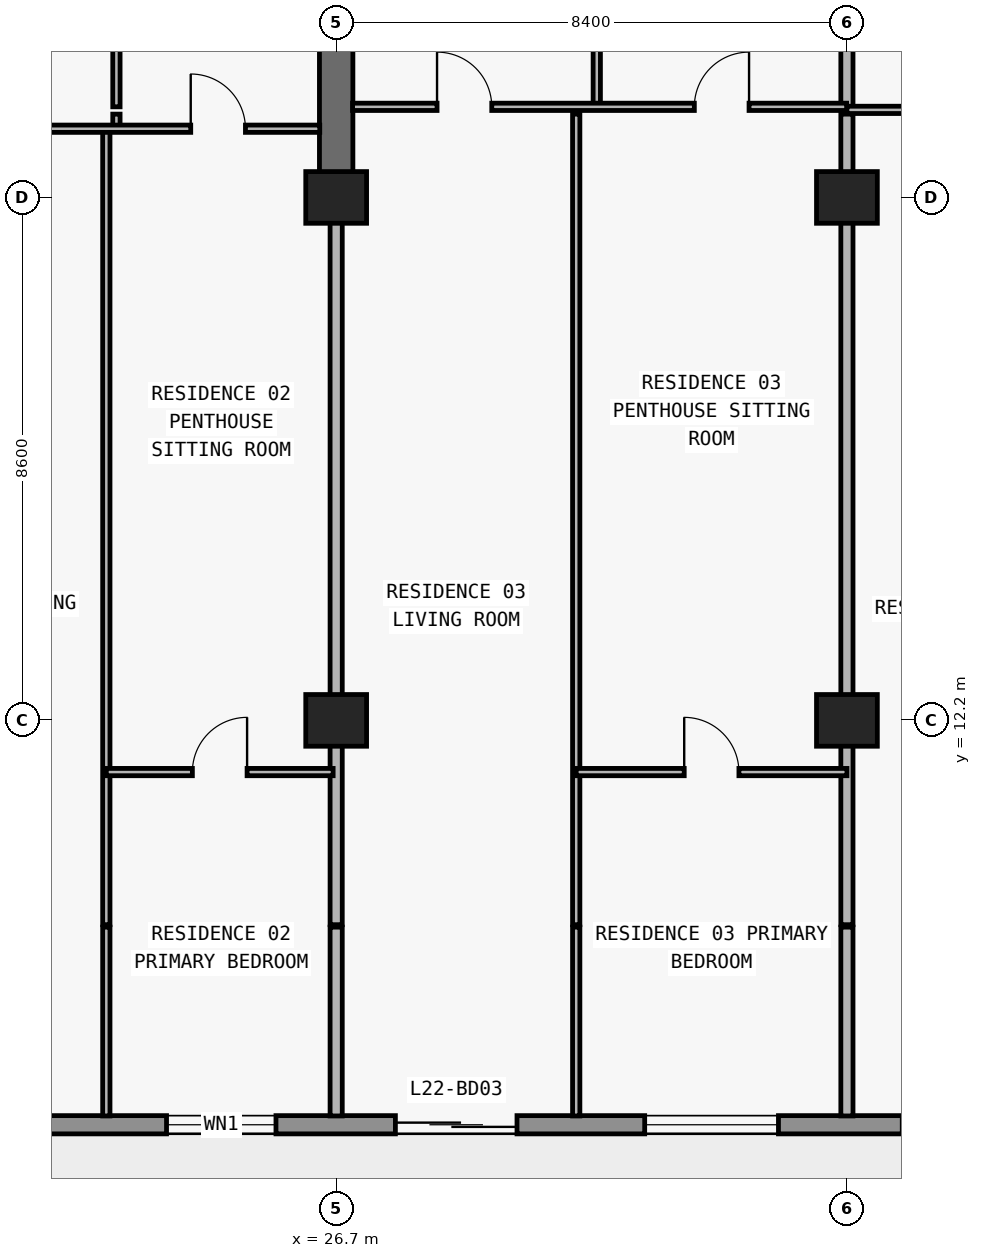
"""IFC4 building model, lengths in metres.
Left out: names, types, materials, properties, quantities, classifications, styles, units other than length and angle.
Written with IfcOpenShell. Run it as: python <this file> out.ifc"""

import sys

from ifc_helpers import new_model, si_unit, direction, frame, frame_2d, origin, origin_2d, place, context, subcontext, project, spatial, rectangle, extrude, element, fill, save


model = new_model("IFC4")
c1 = context("Model", 3, precision=1e-05, world=origin(), true_north=direction((0.0, 1.0)))
c2 = subcontext(c1, "Body", "Model", "MODEL_VIEW")
j1 = project(units=[si_unit("LENGTHUNIT", "METRE"), si_unit("PLANEANGLEUNIT", "RADIAN")], contexts=[c1])
p1 = place(None, origin())
s1 = spatial("IfcSite", under=j1, at=p1, CompositionType="ELEMENT")
p2 = place(p1, origin())
s2 = spatial("IfcBuilding", under=s1, at=p2, CompositionType="ELEMENT")
p3 = place(p2, frame((0.0, 0.0, 84.6)))
s3 = spatial("IfcBuildingStorey", under=s2, at=p3, CompositionType="ELEMENT", Elevation=84.6)
for number, where, z_axis, x_axis in (
    (1, (26.7, 12.2, 0.0), (0.0, 0.0, 1.0), (1.0, 0.0, 0.0)),
    (2, (35.1, 12.2, 0.0), (0.0, 0.0, 1.0), (1.0, 0.0, 0.0)),
    (3, (26.7, 20.8, 0.0), (0.0, 0.0, 1.0), (1.0, 0.0, 0.0)),
    (4, (35.1, 20.8, 0.0), (0.0, 0.0, 1.0), (1.0, 0.0, 0.0)),
):
    element("IfcColumn", number, at=place(p3, frame(where, z_axis=z_axis, x_axis=x_axis)), inside=s3, PredefinedType="COLUMN", context=c2, shape_type="SweptSolid", body=[
        extrude(rectangle(XDim=1.0, YDim=0.85, at=origin_2d()), origin(), (0.0, 0.0, 1.0), 3.05),
    ])
p4 = place(p3, frame((26.7, 20.8, 0.0), z_axis=(0.0, 0.0, 1.0), x_axis=(0.0, 1.0, 0.0)))
e5 = element("IfcWall", 5, at=p4, inside=s3, PredefinedType="SHEAR", context=c2, shape_type="SweptSolid", body=[
    extrude(rectangle(XDim=8.6, YDim=0.55, at=frame_2d((4.3, 0.0))), origin(), (0.0, 0.0, 1.0), 3.05),
])
p5 = place(p3, frame((70.1, 5.55, 0.0), z_axis=(0.0, 0.0, 1.0), x_axis=(-1.0, 0.0, 0.0)))
e6 = element("IfcWall", 6, at=p5, inside=s3, PredefinedType="STANDARD", context=c2, shape_type="SweptSolid", body=[
    extrude(rectangle(XDim=62.4, YDim=0.3, at=frame_2d((31.2, 0.0))), origin(), (0.0, 0.0, 1.0), 3.05),
])
p6 = place(p5, frame((57.226, 0.0, 0.0)))
e7 = element("IfcOpeningElement", 7, at=p6, cuts=e6, PredefinedType="OPENING", context=c2, shape_type="SweptSolid", body=[
    extrude(rectangle(XDim=2.0, YDim=2.3, at=frame_2d((1.0, 1.15))), frame((0.0, 0.16, 0.0), z_axis=(0.0, -1.0, 0.0), x_axis=(1.0, 0.0, 0.0)), (0.0, 0.0, 1.0), 0.32),
])
p7 = place(p5, frame((52.926, 0.0, 0.85)))
e8 = element("IfcOpeningElement", 8, at=p7, cuts=e6, PredefinedType="OPENING", context=c2, shape_type="SweptSolid", body=[
    extrude(rectangle(XDim=2.2, YDim=1.55, at=frame_2d((1.1, 0.775))), frame((0.0, 0.16, 0.0), z_axis=(0.0, -1.0, 0.0), x_axis=(1.0, 0.0, 0.0)), (0.0, 0.0, 1.0), 0.32),
])
p8 = place(p5, frame((48.49, 0.0, 0.0)))
e9 = element("IfcOpeningElement", 9, at=p8, cuts=e6, PredefinedType="OPENING", context=c2, shape_type="SweptSolid", body=[
    extrude(rectangle(XDim=2.0, YDim=2.3, at=frame_2d((1.0, 1.15))), frame((0.0, 0.16, 0.0), z_axis=(0.0, -1.0, 0.0), x_axis=(1.0, 0.0, 0.0)), (0.0, 0.0, 1.0), 0.32),
])
p9 = place(p5, frame((44.39, 0.0, 0.85)))
e10 = element("IfcOpeningElement", 10, at=p9, cuts=e6, PredefinedType="OPENING", context=c2, shape_type="SweptSolid", body=[
    extrude(rectangle(XDim=1.8, YDim=1.55, at=frame_2d((0.9, 0.775))), frame((0.0, 0.16, 0.0), z_axis=(0.0, -1.0, 0.0), x_axis=(1.0, 0.0, 0.0)), (0.0, 0.0, 1.0), 0.32),
])
p10 = place(p5, frame((40.426, 0.0, 0.0)))
e11 = element("IfcOpeningElement", 11, at=p10, cuts=e6, PredefinedType="OPENING", context=c2, shape_type="SweptSolid", body=[
    extrude(rectangle(XDim=2.0, YDim=2.3, at=frame_2d((1.0, 1.15))), frame((0.0, 0.16, 0.0), z_axis=(0.0, -1.0, 0.0), x_axis=(1.0, 0.0, 0.0)), (0.0, 0.0, 1.0), 0.32),
])
p11 = place(p5, frame((36.126, 0.0, 0.85)))
e12 = element("IfcOpeningElement", 12, at=p11, cuts=e6, PredefinedType="OPENING", context=c2, shape_type="SweptSolid", body=[
    extrude(rectangle(XDim=2.2, YDim=1.55, at=frame_2d((1.1, 0.775))), frame((0.0, 0.16, 0.0), z_axis=(0.0, -1.0, 0.0), x_axis=(1.0, 0.0, 0.0)), (0.0, 0.0, 1.0), 0.32),
])
p12 = place(p5, frame((32.09, 0.0, 0.0)))
e13 = element("IfcOpeningElement", 13, at=p12, cuts=e6, PredefinedType="OPENING", context=c2, shape_type="SweptSolid", body=[
    extrude(rectangle(XDim=2.0, YDim=2.3, at=frame_2d((1.0, 1.15))), frame((0.0, 0.16, 0.0), z_axis=(0.0, -1.0, 0.0), x_axis=(1.0, 0.0, 0.0)), (0.0, 0.0, 1.0), 0.32),
])
p13 = place(p5, frame((28.21, 0.0, 0.65)))
e14 = element("IfcOpeningElement", 14, at=p13, cuts=e6, PredefinedType="OPENING", context=c2, shape_type="SweptSolid", body=[
    extrude(rectangle(XDim=2.6, YDim=1.85, at=frame_2d((1.3, 0.925))), frame((0.0, 0.16, 0.0), z_axis=(0.0, -1.0, 0.0), x_axis=(1.0, 0.0, 0.0)), (0.0, 0.0, 1.0), 0.32),
])
p14 = place(p5, frame((22.1, 0.0, 0.85)))
e15 = element("IfcOpeningElement", 15, at=p14, cuts=e6, PredefinedType="OPENING", context=c2, shape_type="SweptSolid", body=[
    extrude(rectangle(XDim=2.2, YDim=1.55, at=frame_2d((1.1, 0.775))), frame((0.0, 0.16, 0.0), z_axis=(0.0, -1.0, 0.0), x_axis=(1.0, 0.0, 0.0)), (0.0, 0.0, 1.0), 0.32),
])
p15 = place(p5, frame((16.026, 0.0, 0.0)))
e16 = element("IfcOpeningElement", 16, at=p15, cuts=e6, PredefinedType="OPENING", context=c2, shape_type="SweptSolid", body=[
    extrude(rectangle(XDim=2.0, YDim=2.3, at=frame_2d((1.0, 1.15))), frame((0.0, 0.16, 0.0), z_axis=(0.0, -1.0, 0.0), x_axis=(1.0, 0.0, 0.0)), (0.0, 0.0, 1.0), 0.32),
])
p16 = place(p5, frame((11.726, 0.0, 0.85)))
e17 = element("IfcOpeningElement", 17, at=p16, cuts=e6, PredefinedType="OPENING", context=c2, shape_type="SweptSolid", body=[
    extrude(rectangle(XDim=2.2, YDim=1.55, at=frame_2d((1.1, 0.775))), frame((0.0, 0.16, 0.0), z_axis=(0.0, -1.0, 0.0), x_axis=(1.0, 0.0, 0.0)), (0.0, 0.0, 1.0), 0.32),
])
p17 = place(p5, frame((7.29, 0.0, 0.0)))
e18 = element("IfcOpeningElement", 18, at=p17, cuts=e6, PredefinedType="OPENING", context=c2, shape_type="SweptSolid", body=[
    extrude(rectangle(XDim=2.0, YDim=2.3, at=frame_2d((1.0, 1.15))), frame((0.0, 0.16, 0.0), z_axis=(0.0, -1.0, 0.0), x_axis=(1.0, 0.0, 0.0)), (0.0, 0.0, 1.0), 0.32),
])
p18 = place(p5, frame((3.19, 0.0, 0.85)))
e19 = element("IfcOpeningElement", 19, at=p18, cuts=e6, PredefinedType="OPENING", context=c2, shape_type="SweptSolid", body=[
    extrude(rectangle(XDim=1.8, YDim=1.55, at=frame_2d((0.9, 0.775))), frame((0.0, 0.16, 0.0), z_axis=(0.0, -1.0, 0.0), x_axis=(1.0, 0.0, 0.0)), (0.0, 0.0, 1.0), 0.32),
])
p19 = place(p3, frame((22.92, 5.695, 0.0), z_axis=(0.0, 0.0, 1.0), x_axis=(0.0, 1.0, 0.0)))
e20 = element("IfcWall", 20, at=p19, inside=s3, PredefinedType="PARTITIONING", context=c2, shape_type="SweptSolid", body=[
    extrude(rectangle(XDim=3.105, YDim=0.12, at=frame_2d((1.552, 0.0))), origin(), (0.0, 0.0, 1.0), 3.05),
])
p20 = place(p3, frame((22.92, 8.84, 0.0), z_axis=(0.0, 0.0, 1.0), x_axis=(0.0, 1.0, 0.0)))
e21 = element("IfcWall", 21, at=p20, inside=s3, PredefinedType="PARTITIONING", context=c2, shape_type="SweptSolid", body=[
    extrude(rectangle(XDim=13.09, YDim=0.12, at=frame_2d((6.545, 0.0))), origin(), (0.0, 0.0, 1.0), 3.05),
])
p21 = place(p3, frame((23.086, 21.935, 0.0), z_axis=(0.0, 0.0, 1.0), x_axis=(0.0, 1.0, 0.0)))
e22 = element("IfcWall", 22, at=p21, inside=s3, PredefinedType="PARTITIONING", context=c2, shape_type="SweptSolid", body=[
    extrude(rectangle(XDim=0.235, YDim=0.12, at=frame_2d((0.117, 0.0))), origin(), (0.0, 0.0, 1.0), 3.05),
])
p22 = place(p3, frame((23.086, 22.29, 0.0), z_axis=(0.0, 0.0, 1.0), x_axis=(0.0, 1.0, 0.0)))
e23 = element("IfcWall", 23, at=p22, inside=s3, PredefinedType="PARTITIONING", context=c2, shape_type="SweptSolid", body=[
    extrude(rectangle(XDim=4.69, YDim=0.12, at=frame_2d((2.345, 0.0))), origin(), (0.0, 0.0, 1.0), 3.05),
])
p23 = place(p22, frame((1.895, 0.0, 0.0)))
e24 = element("IfcOpeningElement", 24, at=p23, cuts=e23, PredefinedType="OPENING", context=c2, shape_type="SweptSolid", body=[
    extrude(rectangle(XDim=0.9, YDim=2.15, at=frame_2d((0.45, 1.075))), frame((0.0, 0.07, 0.0), z_axis=(0.0, -1.0, 0.0), x_axis=(1.0, 0.0, 0.0)), (0.0, 0.0, 1.0), 0.14),
])
p24 = place(p3, frame((26.7, 5.695, 0.0), z_axis=(0.0, 0.0, 1.0), x_axis=(0.0, 1.0, 0.0)))
e25 = element("IfcWall", 25, at=p24, inside=s3, PredefinedType="PARTITIONING", context=c2, shape_type="SweptSolid", body=[
    extrude(rectangle(XDim=3.105, YDim=0.2, at=frame_2d((1.552, 0.0))), origin(), (0.0, 0.0, 1.0), 3.05),
])
p25 = place(p3, frame((26.7, 8.84, 0.0), z_axis=(0.0, 0.0, 1.0), x_axis=(0.0, 1.0, 0.0)))
e26 = element("IfcWall", 26, at=p25, inside=s3, PredefinedType="PARTITIONING", context=c2, shape_type="SweptSolid", body=[
    extrude(rectangle(XDim=11.955, YDim=0.2, at=frame_2d((5.978, 0.0))), origin(), (0.0, 0.0, 1.0), 2.174),
])
p26 = place(p3, frame((30.648, 5.695, 0.0), z_axis=(0.0, 0.0, 1.0), x_axis=(0.0, 1.0, 0.0)))
e27 = element("IfcWall", 27, at=p26, inside=s3, PredefinedType="PARTITIONING", context=c2, shape_type="SweptSolid", body=[
    extrude(rectangle(XDim=3.105, YDim=0.12, at=frame_2d((1.552, 0.0))), origin(), (0.0, 0.0, 1.0), 3.05),
])
p27 = place(p3, frame((30.648, 8.84, 0.0), z_axis=(0.0, 0.0, 1.0), x_axis=(0.0, 1.0, 0.0)))
e28 = element("IfcWall", 28, at=p27, inside=s3, PredefinedType="PARTITIONING", context=c2, shape_type="SweptSolid", body=[
    extrude(rectangle(XDim=13.33, YDim=0.12, at=frame_2d((6.665, 0.0))), origin(), (0.0, 0.0, 1.0), 3.05),
])
p28 = place(p3, frame((30.986, 22.29, 0.0), z_axis=(0.0, 0.0, 1.0), x_axis=(0.0, 1.0, 0.0)))
e29 = element("IfcWall", 29, at=p28, inside=s3, PredefinedType="PARTITIONING", context=c2, shape_type="SweptSolid", body=[
    extrude(rectangle(XDim=4.69, YDim=0.12, at=frame_2d((2.345, 0.0))), origin(), (0.0, 0.0, 1.0), 3.05),
])
p29 = place(p28, frame((1.895, 0.0, 0.0)))
e30 = element("IfcOpeningElement", 30, at=p29, cuts=e29, PredefinedType="OPENING", context=c2, shape_type="SweptSolid", body=[
    extrude(rectangle(XDim=0.9, YDim=2.15, at=frame_2d((0.45, 1.075))), frame((0.0, 0.07, 0.0), z_axis=(0.0, -1.0, 0.0), x_axis=(1.0, 0.0, 0.0)), (0.0, 0.0, 1.0), 0.14),
])
p30 = place(p3, frame((35.1, 5.695, 0.0), z_axis=(0.0, 0.0, 1.0), x_axis=(0.0, 1.0, 0.0)))
e31 = element("IfcWall", 31, at=p30, inside=s3, PredefinedType="PARTITIONING", context=c2, shape_type="SweptSolid", body=[
    extrude(rectangle(XDim=3.105, YDim=0.2, at=frame_2d((1.552, 0.0))), origin(), (0.0, 0.0, 1.0), 3.05),
])
p31 = place(p3, frame((35.1, 8.84, 0.0), z_axis=(0.0, 0.0, 1.0), x_axis=(0.0, 1.0, 0.0)))
e32 = element("IfcWall", 32, at=p31, inside=s3, PredefinedType="PARTITIONING", context=c2, shape_type="SweptSolid", body=[
    extrude(rectangle(XDim=13.33, YDim=0.2, at=frame_2d((6.665, 0.0))), origin(), (0.0, 0.0, 1.0), 2.174),
])
p32 = place(p3, frame((35.1, 22.29, 0.0), z_axis=(0.0, 0.0, 1.0), x_axis=(0.0, 1.0, 0.0)))
e33 = element("IfcWall", 33, at=p32, inside=s3, PredefinedType="PARTITIONING", context=c2, shape_type="SweptSolid", body=[
    extrude(rectangle(XDim=4.69, YDim=0.2, at=frame_2d((2.345, 0.0))), origin(), (0.0, 0.0, 1.0), 2.174),
])
p33 = place(p3, frame((22.92, 11.35, 0.0), z_axis=(0.0, 0.0, 1.0), x_axis=(1.0, 0.0, 0.0)))
e34 = element("IfcWall", 34, at=p33, inside=s3, PredefinedType="PARTITIONING", context=c2, shape_type="SweptSolid", body=[
    extrude(rectangle(XDim=3.73, YDim=0.12, at=frame_2d((1.865, 0.0))), origin(), (0.0, 0.0, 1.0), 3.05),
])
p34 = place(p33, frame((1.415, 0.0, 0.0)))
e35 = element("IfcOpeningElement", 35, at=p34, cuts=e34, PredefinedType="OPENING", context=c2, shape_type="SweptSolid", body=[
    extrude(rectangle(XDim=0.9, YDim=2.15, at=frame_2d((0.45, 1.075))), frame((0.0, 0.07, 0.0), z_axis=(0.0, -1.0, 0.0), x_axis=(1.0, 0.0, 0.0)), (0.0, 0.0, 1.0), 0.14),
])
p35 = place(p3, frame((30.648, 11.35, 0.0), z_axis=(0.0, 0.0, 1.0), x_axis=(1.0, 0.0, 0.0)))
e36 = element("IfcWall", 36, at=p35, inside=s3, PredefinedType="PARTITIONING", context=c2, shape_type="SweptSolid", body=[
    extrude(rectangle(XDim=4.452, YDim=0.12, at=frame_2d((2.226, 0.0))), origin(), (0.0, 0.0, 1.0), 3.05),
])
p36 = place(p35, frame((1.776, 0.0, 0.0)))
e37 = element("IfcOpeningElement", 37, at=p36, cuts=e36, PredefinedType="OPENING", context=c2, shape_type="SweptSolid", body=[
    extrude(rectangle(XDim=0.9, YDim=2.15, at=frame_2d((0.45, 1.075))), frame((0.0, 0.07, 0.0), z_axis=(0.0, -1.0, 0.0), x_axis=(1.0, 0.0, 0.0)), (0.0, 0.0, 1.0), 0.14),
])
p37 = place(p3, frame((18.3, 21.93, 0.0), z_axis=(0.0, 0.0, 1.0), x_axis=(1.0, 0.0, 0.0)))
e38 = element("IfcWall", 38, at=p37, inside=s3, PredefinedType="PARTITIONING", context=c2, shape_type="SweptSolid", body=[
    extrude(rectangle(XDim=8.13, YDim=0.12, at=frame_2d((4.065, 0.0))), origin(), (0.0, 0.0, 1.0), 3.05),
])
p38 = place(p37, frame((1.86, 0.0, 0.0)))
e39 = element("IfcOpeningElement", 39, at=p38, cuts=e38, PredefinedType="OPENING", context=c2, shape_type="SweptSolid", body=[
    extrude(rectangle(XDim=0.9, YDim=2.15, at=frame_2d((0.45, 1.075))), frame((0.0, 0.07, 0.0), z_axis=(0.0, -1.0, 0.0), x_axis=(1.0, 0.0, 0.0)), (0.0, 0.0, 1.0), 0.14),
])
p39 = place(p37, frame((6.008, 0.0, 0.0)))
e40 = element("IfcOpeningElement", 40, at=p39, cuts=e38, PredefinedType="OPENING", context=c2, shape_type="SweptSolid", body=[
    extrude(rectangle(XDim=0.9, YDim=2.15, at=frame_2d((0.45, 1.075))), frame((0.0, 0.07, 0.0), z_axis=(0.0, -1.0, 0.0), x_axis=(1.0, 0.0, 0.0)), (0.0, 0.0, 1.0), 0.14),
])
p40 = place(p3, frame((35.1, 22.24, 0.0), z_axis=(0.0, 0.0, 1.0), x_axis=(1.0, 0.0, 0.0)))
e41 = element("IfcWall", 41, at=p40, inside=s3, PredefinedType="PARTITIONING", context=c2, shape_type="SweptSolid", body=[
    extrude(rectangle(XDim=7.6, YDim=0.12, at=frame_2d((3.8, 0.0))), origin(), (0.0, 0.0, 1.0), 3.05),
])
p41 = place(p40, frame((3.35, 0.0, 0.0)))
e42 = element("IfcOpeningElement", 42, at=p41, cuts=e41, PredefinedType="OPENING", context=c2, shape_type="SweptSolid", body=[
    extrude(rectangle(XDim=0.9, YDim=2.15, at=frame_2d((0.45, 1.075))), frame((0.0, 0.07, 0.0), z_axis=(0.0, -1.0, 0.0), x_axis=(1.0, 0.0, 0.0)), (0.0, 0.0, 1.0), 0.14),
])
p42 = place(p3, frame((26.97, 22.29, 0.0), z_axis=(0.0, 0.0, 1.0), x_axis=(1.0, 0.0, 0.0)))
e43 = element("IfcWall", 43, at=p42, inside=s3, PredefinedType="PARTITIONING", context=c2, shape_type="SweptSolid", body=[
    extrude(rectangle(XDim=8.125, YDim=0.12, at=frame_2d((4.062, 0.0))), origin(), (0.0, 0.0, 1.0), 3.05),
])
p43 = place(p42, frame((1.389, 0.0, 0.0)))
e44 = element("IfcOpeningElement", 44, at=p43, cuts=e43, PredefinedType="OPENING", context=c2, shape_type="SweptSolid", body=[
    extrude(rectangle(XDim=0.9, YDim=2.15, at=frame_2d((0.45, 1.075))), frame((0.0, 0.07, 0.0), z_axis=(0.0, -1.0, 0.0), x_axis=(1.0, 0.0, 0.0)), (0.0, 0.0, 1.0), 0.14),
])
p44 = place(p42, frame((5.621, 0.0, 0.0)))
e45 = element("IfcOpeningElement", 45, at=p44, cuts=e43, PredefinedType="OPENING", context=c2, shape_type="SweptSolid", body=[
    extrude(rectangle(XDim=0.9, YDim=2.15, at=frame_2d((0.45, 1.075))), frame((0.0, 0.07, 0.0), z_axis=(0.0, -1.0, 0.0), x_axis=(1.0, 0.0, 0.0)), (0.0, 0.0, 1.0), 0.14),
])
p45 = place(p9, origin())
e46 = element("IfcWindow", 46, at=p45, inside=s3, PartitioningType="SINGLE_PANEL", PredefinedType="WINDOW", context=c2, shape_type="SweptSolid", body=[
    extrude(rectangle(XDim=1.8, YDim=1.55, at=frame_2d((0.9, 0.775))), frame((0.0, 0.03, 0.0), z_axis=(0.0, -1.0, 0.0), x_axis=(1.0, 0.0, 0.0)), (0.0, 0.0, 1.0), 0.06),
])
fill(e10, e46)
p46 = place(p10, origin())
e47 = element("IfcDoor", 47, at=p46, inside=s3, OperationType="DOUBLE_DOOR_SLIDING", PredefinedType="DOOR", context=c2, shape_type="SweptSolid", body=[
    extrude(rectangle(XDim=2.0, YDim=2.3, at=frame_2d((1.0, 1.15))), frame((0.0, 0.025, 0.0), z_axis=(0.0, -1.0, 0.0), x_axis=(1.0, 0.0, 0.0)), (0.0, 0.0, 1.0), 0.05),
])
fill(e11, e47)
p47 = place(p11, origin())
e48 = element("IfcWindow", 48, at=p47, inside=s3, PartitioningType="SINGLE_PANEL", PredefinedType="WINDOW", context=c2, shape_type="SweptSolid", body=[
    extrude(rectangle(XDim=2.2, YDim=1.55, at=frame_2d((1.1, 0.775))), frame((0.0, 0.03, 0.0), z_axis=(0.0, -1.0, 0.0), x_axis=(1.0, 0.0, 0.0)), (0.0, 0.0, 1.0), 0.06),
])
fill(e12, e48)
p48 = place(p39, origin())
e49 = element("IfcDoor", 49, at=p48, inside=s3, OperationType="SINGLE_SWING_LEFT", PredefinedType="DOOR", context=c2, shape_type="SweptSolid", body=[
    extrude(rectangle(XDim=0.9, YDim=2.15, at=frame_2d((0.45, 1.075))), frame((0.0, 0.025, 0.0), z_axis=(0.0, -1.0, 0.0), x_axis=(1.0, 0.0, 0.0)), (0.0, 0.0, 1.0), 0.05),
])
fill(e40, e49)
p49 = place(p34, origin())
e50 = element("IfcDoor", 50, at=p49, inside=s3, OperationType="SINGLE_SWING_RIGHT", PredefinedType="DOOR", context=c2, shape_type="SweptSolid", body=[
    extrude(rectangle(XDim=0.9, YDim=2.15, at=frame_2d((0.45, 1.075))), frame((0.0, 0.025, 0.0), z_axis=(0.0, -1.0, 0.0), x_axis=(1.0, 0.0, 0.0)), (0.0, 0.0, 1.0), 0.05),
])
fill(e35, e50)
p50 = place(p43, origin())
e51 = element("IfcDoor", 51, at=p50, inside=s3, OperationType="SINGLE_SWING_LEFT", PredefinedType="DOOR", context=c2, shape_type="SweptSolid", body=[
    extrude(rectangle(XDim=0.9, YDim=2.15, at=frame_2d((0.45, 1.075))), frame((0.0, 0.025, 0.0), z_axis=(0.0, -1.0, 0.0), x_axis=(1.0, 0.0, 0.0)), (0.0, 0.0, 1.0), 0.05),
])
fill(e44, e51)
p51 = place(p44, origin())
e52 = element("IfcDoor", 52, at=p51, inside=s3, OperationType="SINGLE_SWING_RIGHT", PredefinedType="DOOR", context=c2, shape_type="SweptSolid", body=[
    extrude(rectangle(XDim=0.9, YDim=2.15, at=frame_2d((0.45, 1.075))), frame((0.0, 0.025, 0.0), z_axis=(0.0, -1.0, 0.0), x_axis=(1.0, 0.0, 0.0)), (0.0, 0.0, 1.0), 0.05),
])
fill(e45, e52)
p52 = place(p36, origin())
e53 = element("IfcDoor", 53, at=p52, inside=s3, OperationType="SINGLE_SWING_LEFT", PredefinedType="DOOR", context=c2, shape_type="SweptSolid", body=[
    extrude(rectangle(XDim=0.9, YDim=2.15, at=frame_2d((0.45, 1.075))), frame((0.0, 0.025, 0.0), z_axis=(0.0, -1.0, 0.0), x_axis=(1.0, 0.0, 0.0)), (0.0, 0.0, 1.0), 0.05),
])
fill(e37, e53)
save(model, sys.argv[1])
